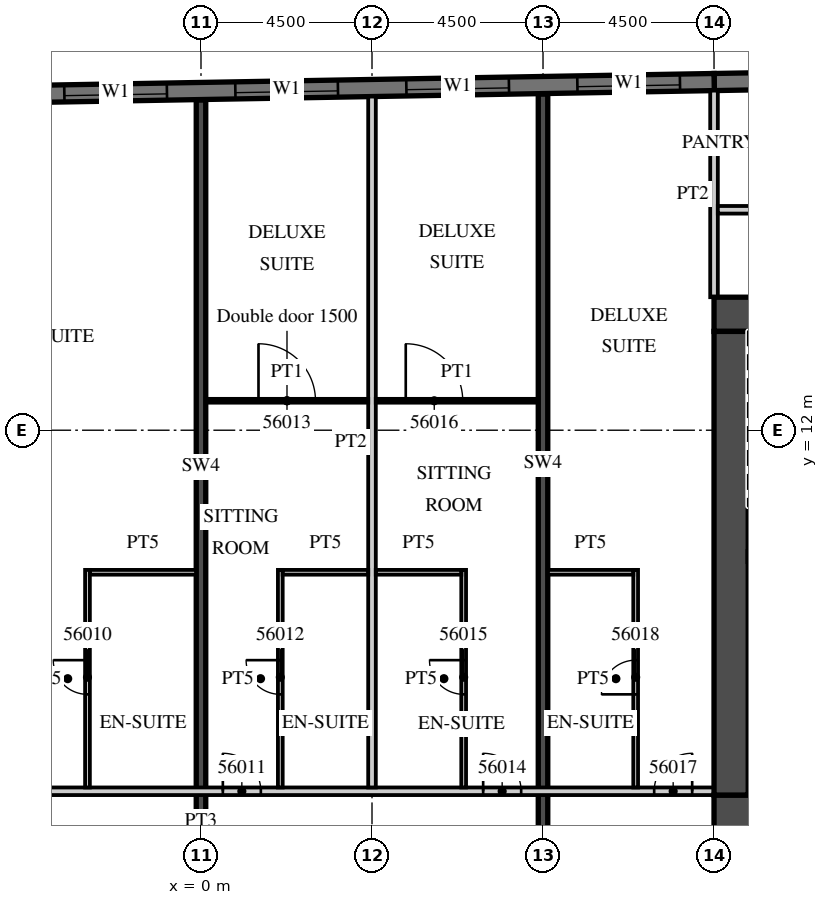
"""IFC4 building model, lengths in metres.
Left out: names, types, materials, properties, quantities, classifications, styles, units other than length and angle.
Written with IfcOpenShell. Run it as: python <this file> out.ifc"""

import sys

from ifc_helpers import new_model, si_unit, direction, frame, frame_2d, origin, place, context, subcontext, project, spatial, rectangle, extrude, element, fill, save


model = new_model("IFC4")
c1 = context("Model", 3, precision=1e-05, world=origin(), true_north=direction((0.0, 1.0)))
c2 = subcontext(c1, "Body", "Model", "MODEL_VIEW")
j1 = project(units=[si_unit("LENGTHUNIT", "METRE"), si_unit("PLANEANGLEUNIT", "RADIAN")], contexts=[c1])
p1 = place(None, origin())
s1 = spatial("IfcSite", under=j1, at=p1, CompositionType="ELEMENT")
p2 = place(p1, origin())
s2 = spatial("IfcBuilding", under=s1, at=p2, CompositionType="ELEMENT")
p3 = place(p2, frame((0.0, 0.0, 230.9)))
s3 = spatial("IfcBuildingStorey", under=s2, at=p3, CompositionType="ELEMENT", Elevation=230.9)
p4 = place(p3, frame((0.0, 1.4, 0.0), z_axis=(0.0, 0.0, 1.0), x_axis=(0.0, 1.0, 0.0)))
e1 = element("IfcWall", 1, at=p4, inside=s3, PredefinedType="SHEAR", context=c2, shape_type="SweptSolid", body=[
    extrude(rectangle(XDim=19.289, YDim=0.25, at=frame_2d((9.644, 0.0))), origin(), (0.0, 0.0, 1.0), 3.3),
])
p5 = place(p3, frame((9.0, 1.4, 0.0), z_axis=(0.0, 0.0, 1.0), x_axis=(0.0, 1.0, 0.0)))
e2 = element("IfcWall", 2, at=p5, inside=s3, PredefinedType="SHEAR", context=c2, shape_type="SweptSolid", body=[
    extrude(rectangle(XDim=19.446, YDim=0.25, at=frame_2d((9.723, 0.0))), origin(), (0.0, 0.0, 1.0), 3.3),
])
p6 = place(p3, frame((31.504, 21.476, 0.0), z_axis=(0.0, 0.0, 1.0), x_axis=(-0.999847677887, -0.017453395744, 0.0)))
e3 = element("IfcWall", 3, at=p6, inside=s3, PredefinedType="SOLIDWALL", context=c2, shape_type="SweptSolid", body=[
    extrude(rectangle(XDim=18.003, YDim=0.45, at=frame_2d((9.001, 0.0))), origin(), (0.0, 0.0, 1.0), 3.02),
])
p7 = place(p3, frame((13.504, 21.161, 0.0), z_axis=(0.0, 0.0, 1.0), x_axis=(-0.999847763257, -0.017448504532, 0.0)))
e4 = element("IfcWall", 4, at=p7, inside=s3, PredefinedType="SOLIDWALL", context=c2, shape_type="SweptSolid", body=[
    extrude(rectangle(XDim=46.859, YDim=0.45, at=frame_2d((23.43, 0.0))), origin(), (0.0, 0.0, 1.0), 3.02),
])
p8 = place(p7, frame((0.9, 0.0, 0.45)))
e5 = element("IfcOpeningElement", 5, at=p8, cuts=e4, PredefinedType="OPENING", context=c2, shape_type="SweptSolid", body=[
    extrude(rectangle(XDim=2.7, YDim=2.25, at=frame_2d((1.35, 1.125))), frame((0.0, 0.235, 0.0), z_axis=(0.0, -1.0, 0.0), x_axis=(1.0, 0.0, 0.0)), (0.0, 0.0, 1.0), 0.47),
])
p9 = place(p7, frame((5.401, 0.0, 0.45)))
e6 = element("IfcOpeningElement", 6, at=p9, cuts=e4, PredefinedType="OPENING", context=c2, shape_type="SweptSolid", body=[
    extrude(rectangle(XDim=2.7, YDim=2.25, at=frame_2d((1.35, 1.125))), frame((0.0, 0.235, 0.0), z_axis=(0.0, -1.0, 0.0), x_axis=(1.0, 0.0, 0.0)), (0.0, 0.0, 1.0), 0.47),
])
p10 = place(p7, frame((9.902, 0.0, 0.45)))
e7 = element("IfcOpeningElement", 7, at=p10, cuts=e4, PredefinedType="OPENING", context=c2, shape_type="SweptSolid", body=[
    extrude(rectangle(XDim=2.7, YDim=2.25, at=frame_2d((1.35, 1.125))), frame((0.0, 0.235, 0.0), z_axis=(0.0, -1.0, 0.0), x_axis=(1.0, 0.0, 0.0)), (0.0, 0.0, 1.0), 0.47),
])
p11 = place(p7, frame((14.402, 0.0, 0.45)))
e8 = element("IfcOpeningElement", 8, at=p11, cuts=e4, PredefinedType="OPENING", context=c2, shape_type="SweptSolid", body=[
    extrude(rectangle(XDim=2.7, YDim=2.25, at=frame_2d((1.35, 1.125))), frame((0.0, 0.235, 0.0), z_axis=(0.0, -1.0, 0.0), x_axis=(1.0, 0.0, 0.0)), (0.0, 0.0, 1.0), 0.47),
])
p12 = place(p7, frame((18.903, 0.0, 0.45)))
e9 = element("IfcOpeningElement", 9, at=p12, cuts=e4, PredefinedType="OPENING", context=c2, shape_type="SweptSolid", body=[
    extrude(rectangle(XDim=2.7, YDim=2.25, at=frame_2d((1.35, 1.125))), frame((0.0, 0.235, 0.0), z_axis=(0.0, -1.0, 0.0), x_axis=(1.0, 0.0, 0.0)), (0.0, 0.0, 1.0), 0.47),
])
p13 = place(p7, frame((23.404, 0.0, 0.45)))
e10 = element("IfcOpeningElement", 10, at=p13, cuts=e4, PredefinedType="OPENING", context=c2, shape_type="SweptSolid", body=[
    extrude(rectangle(XDim=2.7, YDim=2.25, at=frame_2d((1.35, 1.125))), frame((0.0, 0.235, 0.0), z_axis=(0.0, -1.0, 0.0), x_axis=(1.0, 0.0, 0.0)), (0.0, 0.0, 1.0), 0.47),
])
p14 = place(p7, frame((27.904, 0.0, 0.45)))
e11 = element("IfcOpeningElement", 11, at=p14, cuts=e4, PredefinedType="OPENING", context=c2, shape_type="SweptSolid", body=[
    extrude(rectangle(XDim=2.7, YDim=2.25, at=frame_2d((1.35, 1.125))), frame((0.0, 0.235, 0.0), z_axis=(0.0, -1.0, 0.0), x_axis=(1.0, 0.0, 0.0)), (0.0, 0.0, 1.0), 0.47),
])
p15 = place(p7, frame((32.405, 0.0, 0.45)))
e12 = element("IfcOpeningElement", 12, at=p15, cuts=e4, PredefinedType="OPENING", context=c2, shape_type="SweptSolid", body=[
    extrude(rectangle(XDim=2.7, YDim=2.25, at=frame_2d((1.35, 1.125))), frame((0.0, 0.235, 0.0), z_axis=(0.0, -1.0, 0.0), x_axis=(1.0, 0.0, 0.0)), (0.0, 0.0, 1.0), 0.47),
])
p16 = place(p7, frame((36.906, 0.0, 0.45)))
e13 = element("IfcOpeningElement", 13, at=p16, cuts=e4, PredefinedType="OPENING", context=c2, shape_type="SweptSolid", body=[
    extrude(rectangle(XDim=2.7, YDim=2.25, at=frame_2d((1.35, 1.125))), frame((0.0, 0.235, 0.0), z_axis=(0.0, -1.0, 0.0), x_axis=(1.0, 0.0, 0.0)), (0.0, 0.0, 1.0), 0.47),
])
p17 = place(p7, frame((41.406, 0.0, 0.45)))
e14 = element("IfcOpeningElement", 14, at=p17, cuts=e4, PredefinedType="OPENING", context=c2, shape_type="SweptSolid", body=[
    extrude(rectangle(XDim=2.7, YDim=2.25, at=frame_2d((1.35, 1.125))), frame((0.0, 0.235, 0.0), z_axis=(0.0, -1.0, 0.0), x_axis=(1.0, 0.0, 0.0)), (0.0, 0.0, 1.0), 0.47),
])
p18 = place(p3, frame((13.5, 15.5, 0.0), z_axis=(0.0, 0.0, 1.0), x_axis=(0.0, 1.0, 0.0)))
e15 = element("IfcWall", 15, at=p18, inside=s3, PredefinedType="PARTITIONING", context=c2, shape_type="SweptSolid", body=[
    extrude(rectangle(XDim=5.436, YDim=0.2, at=frame_2d((2.718, 0.0))), origin(), (0.0, 0.0, 1.0), 3.02),
])
p19 = place(p3, frame((-13.5, 2.5, 0.0), z_axis=(0.0, 0.0, 1.0), x_axis=(1.0, 0.0, 0.0)))
e16 = element("IfcWall", 16, at=p19, inside=s3, PredefinedType="PARTITIONING", context=c2, shape_type="SweptSolid", body=[
    extrude(rectangle(XDim=27.0, YDim=0.2, at=frame_2d((13.5, 0.0))), origin(), (0.0, 0.0, 1.0), 3.02),
])
p20 = place(p19, frame((2.925, 0.0, 0.0)))
e17 = element("IfcOpeningElement", 17, at=p20, cuts=e16, PredefinedType="OPENING", context=c2, shape_type="SweptSolid", body=[
    extrude(rectangle(XDim=1.0, YDim=2.1, at=frame_2d((0.5, 1.05))), frame((0.0, 0.11, 0.0), z_axis=(0.0, -1.0, 0.0), x_axis=(1.0, 0.0, 0.0)), (0.0, 0.0, 1.0), 0.22),
])
p21 = place(p19, frame((6.938, 0.0, 0.0)))
e18 = element("IfcOpeningElement", 18, at=p21, cuts=e16, PredefinedType="OPENING", context=c2, shape_type="SweptSolid", body=[
    extrude(rectangle(XDim=1.2, YDim=2.1, at=frame_2d((0.6, 1.05))), frame((0.0, 0.11, 0.0), z_axis=(0.0, -1.0, 0.0), x_axis=(1.0, 0.0, 0.0)), (0.0, 0.0, 1.0), 0.22),
])
p22 = place(p19, frame((14.075, 0.0, 0.0)))
e19 = element("IfcOpeningElement", 19, at=p22, cuts=e16, PredefinedType="OPENING", context=c2, shape_type="SweptSolid", body=[
    extrude(rectangle(XDim=1.0, YDim=2.1, at=frame_2d((0.5, 1.05))), frame((0.0, 0.11, 0.0), z_axis=(0.0, -1.0, 0.0), x_axis=(1.0, 0.0, 0.0)), (0.0, 0.0, 1.0), 0.22),
])
p23 = place(p19, frame((20.925, 0.0, 0.0)))
e20 = element("IfcOpeningElement", 20, at=p23, cuts=e16, PredefinedType="OPENING", context=c2, shape_type="SweptSolid", body=[
    extrude(rectangle(XDim=1.0, YDim=2.1, at=frame_2d((0.5, 1.05))), frame((0.0, 0.11, 0.0), z_axis=(0.0, -1.0, 0.0), x_axis=(1.0, 0.0, 0.0)), (0.0, 0.0, 1.0), 0.22),
])
p24 = place(p19, frame((25.425, 0.0, 0.0)))
e21 = element("IfcOpeningElement", 21, at=p24, cuts=e16, PredefinedType="OPENING", context=c2, shape_type="SweptSolid", body=[
    extrude(rectangle(XDim=1.0, YDim=2.1, at=frame_2d((0.5, 1.05))), frame((0.0, 0.11, 0.0), z_axis=(0.0, -1.0, 0.0), x_axis=(1.0, 0.0, 0.0)), (0.0, 0.0, 1.0), 0.22),
])
p25 = place(p3, frame((-2.987, 2.6, 0.0), z_axis=(0.0, 0.0, 1.0), x_axis=(0.0, 1.0, 0.0)))
e22 = element("IfcWall", 22, at=p25, inside=s3, PredefinedType="PARTITIONING", context=c2, shape_type="SweptSolid", body=[
    extrude(rectangle(XDim=5.725, YDim=0.125, at=frame_2d((2.862, 0.0))), origin(), (0.0, 0.0, 1.0), 3.02),
])
p26 = place(p25, frame((2.45, 0.0, 0.0)))
e23 = element("IfcOpeningElement", 23, at=p26, cuts=e22, PredefinedType="OPENING", context=c2, shape_type="SweptSolid", body=[
    extrude(rectangle(XDim=0.9, YDim=2.1, at=frame_2d((0.45, 1.05))), frame((0.0, 0.073, 0.0), z_axis=(0.0, -1.0, 0.0), x_axis=(1.0, 0.0, 0.0)), (0.0, 0.0, 1.0), 0.145),
])
p27 = place(p3, frame((-2.925, 8.262, 0.0), z_axis=(0.0, 0.0, 1.0), x_axis=(1.0, 0.0, 0.0)))
e24 = element("IfcWall", 24, at=p27, inside=s3, PredefinedType="PARTITIONING", context=c2, shape_type="SweptSolid", body=[
    extrude(rectangle(XDim=2.8, YDim=0.125, at=frame_2d((1.4, 0.0))), origin(), (0.0, 0.0, 1.0), 3.02),
])
p28 = place(p3, frame((4.5, 2.6, 0.0), z_axis=(0.0, 0.0, 1.0), x_axis=(0.0, 1.0, 0.0)))
e25 = element("IfcWall", 25, at=p28, inside=s3, PredefinedType="PARTITIONING", context=c2, shape_type="SweptSolid", body=[
    extrude(rectangle(XDim=18.179, YDim=0.2, at=frame_2d((9.089, 0.0))), origin(), (0.0, 0.0, 1.0), 3.02),
])
p29 = place(p3, frame((2.087, 2.6, 0.0), z_axis=(0.0, 0.0, 1.0), x_axis=(0.0, 1.0, 0.0)))
e26 = element("IfcWall", 26, at=p29, inside=s3, PredefinedType="PARTITIONING", context=c2, shape_type="SweptSolid", body=[
    extrude(rectangle(XDim=5.725, YDim=0.125, at=frame_2d((2.862, 0.0))), origin(), (0.0, 0.0, 1.0), 3.02),
])
p30 = place(p29, frame((2.45, 0.0, 0.0)))
e27 = element("IfcOpeningElement", 27, at=p30, cuts=e26, PredefinedType="OPENING", context=c2, shape_type="SweptSolid", body=[
    extrude(rectangle(XDim=0.9, YDim=2.1, at=frame_2d((0.45, 1.05))), frame((0.0, 0.073, 0.0), z_axis=(0.0, -1.0, 0.0), x_axis=(1.0, 0.0, 0.0)), (0.0, 0.0, 1.0), 0.145),
])
p31 = place(p3, frame((2.15, 8.262, 0.0), z_axis=(0.0, 0.0, 1.0), x_axis=(1.0, 0.0, 0.0)))
e28 = element("IfcWall", 28, at=p31, inside=s3, PredefinedType="PARTITIONING", context=c2, shape_type="SweptSolid", body=[
    extrude(rectangle(XDim=2.25, YDim=0.125, at=frame_2d((1.125, 0.0))), origin(), (0.0, 0.0, 1.0), 3.02),
])
p32 = place(p3, frame((0.125, 12.775, 0.0), z_axis=(0.0, 0.0, 1.0), x_axis=(1.0, 0.0, 0.0)))
e29 = element("IfcWall", 29, at=p32, inside=s3, PredefinedType="PARTITIONING", context=c2, shape_type="SweptSolid", body=[
    extrude(rectangle(XDim=4.275, YDim=0.1, at=frame_2d((2.137, 0.0))), origin(), (0.0, 0.0, 1.0), 3.02),
])
p33 = place(p32, frame((1.388, 0.0, 0.0)))
e30 = element("IfcOpeningElement", 30, at=p33, cuts=e29, PredefinedType="OPENING", context=c2, shape_type="SweptSolid", body=[
    extrude(rectangle(XDim=1.5, YDim=2.1, at=frame_2d((0.75, 1.05))), frame((0.0, 0.06, 0.0), z_axis=(0.0, -1.0, 0.0), x_axis=(1.0, 0.0, 0.0)), (0.0, 0.0, 1.0), 0.12),
])
p34 = place(p3, frame((6.912, 2.6, 0.0), z_axis=(0.0, 0.0, 1.0), x_axis=(0.0, 1.0, 0.0)))
e31 = element("IfcWall", 31, at=p34, inside=s3, PredefinedType="PARTITIONING", context=c2, shape_type="SweptSolid", body=[
    extrude(rectangle(XDim=5.725, YDim=0.125, at=frame_2d((2.862, 0.0))), origin(), (0.0, 0.0, 1.0), 3.02),
])
p35 = place(p34, frame((2.45, 0.0, 0.0)))
e32 = element("IfcOpeningElement", 32, at=p35, cuts=e31, PredefinedType="OPENING", context=c2, shape_type="SweptSolid", body=[
    extrude(rectangle(XDim=0.9, YDim=2.1, at=frame_2d((0.45, 1.05))), frame((0.0, 0.073, 0.0), z_axis=(0.0, -1.0, 0.0), x_axis=(1.0, 0.0, 0.0)), (0.0, 0.0, 1.0), 0.145),
])
p36 = place(p3, frame((4.6, 8.262, 0.0), z_axis=(0.0, 0.0, 1.0), x_axis=(1.0, 0.0, 0.0)))
e33 = element("IfcWall", 33, at=p36, inside=s3, PredefinedType="PARTITIONING", context=c2, shape_type="SweptSolid", body=[
    extrude(rectangle(XDim=2.25, YDim=0.125, at=frame_2d((1.125, 0.0))), origin(), (0.0, 0.0, 1.0), 3.02),
])
p37 = place(p3, frame((4.6, 12.775, 0.0), z_axis=(0.0, 0.0, 1.0), x_axis=(1.0, 0.0, 0.0)))
e34 = element("IfcWall", 34, at=p37, inside=s3, PredefinedType="PARTITIONING", context=c2, shape_type="SweptSolid", body=[
    extrude(rectangle(XDim=4.275, YDim=0.1, at=frame_2d((2.137, 0.0))), origin(), (0.0, 0.0, 1.0), 3.02),
])
p38 = place(p37, frame((0.788, 0.0, 0.0)))
e35 = element("IfcOpeningElement", 35, at=p38, cuts=e34, PredefinedType="OPENING", context=c2, shape_type="SweptSolid", body=[
    extrude(rectangle(XDim=1.5, YDim=2.1, at=frame_2d((0.75, 1.05))), frame((0.0, 0.06, 0.0), z_axis=(0.0, -1.0, 0.0), x_axis=(1.0, 0.0, 0.0)), (0.0, 0.0, 1.0), 0.12),
])
p39 = place(p3, frame((11.438, 2.6, 0.0), z_axis=(0.0, 0.0, 1.0), x_axis=(0.0, 1.0, 0.0)))
e36 = element("IfcWall", 36, at=p39, inside=s3, PredefinedType="PARTITIONING", context=c2, shape_type="SweptSolid", body=[
    extrude(rectangle(XDim=5.725, YDim=0.125, at=frame_2d((2.862, 0.0))), origin(), (0.0, 0.0, 1.0), 3.02),
])
p40 = place(p39, frame((2.45, 0.0, 0.0)))
e37 = element("IfcOpeningElement", 37, at=p40, cuts=e36, PredefinedType="OPENING", context=c2, shape_type="SweptSolid", body=[
    extrude(rectangle(XDim=0.9, YDim=2.1, at=frame_2d((0.45, 1.05))), frame((0.0, 0.073, 0.0), z_axis=(0.0, -1.0, 0.0), x_axis=(1.0, 0.0, 0.0)), (0.0, 0.0, 1.0), 0.145),
])
p41 = place(p3, frame((9.125, 8.262, 0.0), z_axis=(0.0, 0.0, 1.0), x_axis=(1.0, 0.0, 0.0)))
e38 = element("IfcWall", 38, at=p41, inside=s3, PredefinedType="PARTITIONING", context=c2, shape_type="SweptSolid", body=[
    extrude(rectangle(XDim=2.25, YDim=0.125, at=frame_2d((1.125, 0.0))), origin(), (0.0, 0.0, 1.0), 3.02),
])
p42 = place(p3, frame((13.5, 1.95, 0.0), z_axis=(0.0, 0.0, 1.0), x_axis=(1.0, 0.0, 0.0)))
e39 = element("IfcWall", 39, at=p42, inside=s3, PredefinedType="SHEAR", context=c2, shape_type="SweptSolid", body=[
    extrude(rectangle(XDim=18.0, YDim=0.9, at=frame_2d((9.0, 0.0))), origin(), (0.0, 0.0, 1.0), 3.02),
])
p43 = place(p42, frame((1.475, 0.0, 0.0)))
e40 = element("IfcOpeningElement", 40, at=p43, cuts=e39, PredefinedType="OPENING", context=c2, shape_type="SweptSolid", body=[
    extrude(rectangle(XDim=1.8, YDim=2.1, at=frame_2d((0.9, 1.05))), frame((0.0, 0.46, 0.0), z_axis=(0.0, -1.0, 0.0), x_axis=(1.0, 0.0, 0.0)), (0.0, 0.0, 1.0), 0.92),
])
p44 = place(p3, frame((13.5, 15.05, 0.0), z_axis=(0.0, 0.0, 1.0), x_axis=(1.0, 0.0, 0.0)))
e41 = element("IfcWall", 41, at=p44, inside=s3, PredefinedType="SHEAR", context=c2, shape_type="SweptSolid", body=[
    extrude(rectangle(XDim=6.8, YDim=0.9, at=frame_2d((3.4, 0.0))), origin(), (0.0, 0.0, 1.0), 3.02),
])
p45 = place(p44, frame((4.725, 0.0, 0.0)))
e42 = element("IfcOpeningElement", 42, at=p45, cuts=e41, PredefinedType="OPENING", context=c2, shape_type="SweptSolid", body=[
    extrude(rectangle(XDim=1.2, YDim=2.1, at=frame_2d((0.6, 1.05))), frame((0.0, 0.46, 0.0), z_axis=(0.0, -1.0, 0.0), x_axis=(1.0, 0.0, 0.0)), (0.0, 0.0, 1.0), 0.92),
])
p46 = place(p3, frame((13.95, 2.4, 0.0), z_axis=(0.0, 0.0, 1.0), x_axis=(0.0, 1.0, 0.0)))
e43 = element("IfcWall", 43, at=p46, inside=s3, PredefinedType="SHEAR", context=c2, shape_type="SweptSolid", body=[
    extrude(rectangle(XDim=12.2, YDim=0.9, at=frame_2d((6.1, 0.0))), origin(), (0.0, 0.0, 1.0), 3.02),
])
p47 = place(p3, frame((13.6, 17.8, 0.0), z_axis=(0.0, 0.0, 1.0), x_axis=(1.0, 0.0, 0.0)))
e44 = element("IfcWall", 44, at=p47, inside=s3, PredefinedType="PARTITIONING", context=c2, shape_type="SweptSolid", body=[
    extrude(rectangle(XDim=28.657, YDim=0.2, at=frame_2d((14.329, 0.0))), origin(), (0.0, 0.0, 1.0), 3.02),
])
p48 = place(p47, frame((15.012, 0.0, 0.0)))
e45 = element("IfcOpeningElement", 45, at=p48, cuts=e44, PredefinedType="OPENING", context=c2, shape_type="SweptSolid", body=[
    extrude(rectangle(XDim=0.9, YDim=2.1, at=frame_2d((0.45, 1.05))), frame((0.0, 0.11, 0.0), z_axis=(0.0, -1.0, 0.0), x_axis=(1.0, 0.0, 0.0)), (0.0, 0.0, 1.0), 0.22),
])
p49 = place(p47, frame((6.712, 0.0, 0.0)))
e46 = element("IfcOpeningElement", 46, at=p49, cuts=e44, PredefinedType="OPENING", context=c2, shape_type="SweptSolid", body=[
    extrude(rectangle(XDim=0.9, YDim=2.1, at=frame_2d((0.45, 1.05))), frame((0.0, 0.11, 0.0), z_axis=(0.0, -1.0, 0.0), x_axis=(1.0, 0.0, 0.0)), (0.0, 0.0, 1.0), 0.22),
])
p50 = place(p8, origin())
e47 = element("IfcWindow", 47, at=p50, inside=s3, PartitioningType="SINGLE_PANEL", PredefinedType="WINDOW", context=c2, shape_type="SweptSolid", body=[
    extrude(rectangle(XDim=2.7, YDim=2.25, at=frame_2d((1.35, 1.125))), frame((0.0, 0.09, 0.0), z_axis=(0.0, -1.0, 0.0), x_axis=(1.0, 0.0, 0.0)), (0.0, 0.0, 1.0), 0.06),
])
fill(e5, e47)
p51 = place(p9, origin())
e48 = element("IfcWindow", 48, at=p51, inside=s3, PartitioningType="SINGLE_PANEL", PredefinedType="WINDOW", context=c2, shape_type="SweptSolid", body=[
    extrude(rectangle(XDim=2.7, YDim=2.25, at=frame_2d((1.35, 1.125))), frame((0.0, 0.09, 0.0), z_axis=(0.0, -1.0, 0.0), x_axis=(1.0, 0.0, 0.0)), (0.0, 0.0, 1.0), 0.06),
])
fill(e6, e48)
p52 = place(p10, origin())
e49 = element("IfcWindow", 49, at=p52, inside=s3, PartitioningType="SINGLE_PANEL", PredefinedType="WINDOW", context=c2, shape_type="SweptSolid", body=[
    extrude(rectangle(XDim=2.7, YDim=2.25, at=frame_2d((1.35, 1.125))), frame((0.0, 0.09, 0.0), z_axis=(0.0, -1.0, 0.0), x_axis=(1.0, 0.0, 0.0)), (0.0, 0.0, 1.0), 0.06),
])
fill(e7, e49)
p53 = place(p11, origin())
e50 = element("IfcWindow", 50, at=p53, inside=s3, PartitioningType="SINGLE_PANEL", PredefinedType="WINDOW", context=c2, shape_type="SweptSolid", body=[
    extrude(rectangle(XDim=2.7, YDim=2.25, at=frame_2d((1.35, 1.125))), frame((0.0, 0.09, 0.0), z_axis=(0.0, -1.0, 0.0), x_axis=(1.0, 0.0, 0.0)), (0.0, 0.0, 1.0), 0.06),
])
fill(e8, e50)
p54 = place(p26, origin())
e51 = element("IfcDoor", 51, at=p54, inside=s3, OperationType="SINGLE_SWING_RIGHT", PredefinedType="DOOR", context=c2, shape_type="SweptSolid", body=[
    extrude(rectangle(XDim=0.9, YDim=2.1, at=frame_2d((0.45, 1.05))), frame((0.0, 0.025, 0.0), z_axis=(0.0, -1.0, 0.0), x_axis=(1.0, 0.0, 0.0)), (0.0, 0.0, 1.0), 0.05),
])
fill(e23, e51)
p55 = place(p22, origin())
e52 = element("IfcDoor", 52, at=p55, inside=s3, OperationType="SINGLE_SWING_LEFT", PredefinedType="DOOR", context=c2, shape_type="SweptSolid", body=[
    extrude(rectangle(XDim=1.0, YDim=2.1, at=frame_2d((0.5, 1.05))), frame((0.0, 0.025, 0.0), z_axis=(0.0, -1.0, 0.0), x_axis=(1.0, 0.0, 0.0)), (0.0, 0.0, 1.0), 0.05),
])
fill(e19, e52)
p56 = place(p30, origin())
e53 = element("IfcDoor", 53, at=p56, inside=s3, OperationType="SINGLE_SWING_RIGHT", PredefinedType="DOOR", context=c2, shape_type="SweptSolid", body=[
    extrude(rectangle(XDim=0.9, YDim=2.1, at=frame_2d((0.45, 1.05))), frame((0.0, 0.025, 0.0), z_axis=(0.0, -1.0, 0.0), x_axis=(1.0, 0.0, 0.0)), (0.0, 0.0, 1.0), 0.05),
])
fill(e27, e53)
p57 = place(p33, origin())
e54 = element("IfcDoor", 54, at=p57, inside=s3, OperationType="SINGLE_SWING_LEFT", PredefinedType="DOOR", context=c2, shape_type="SweptSolid", body=[
    extrude(rectangle(XDim=1.5, YDim=2.1, at=frame_2d((0.75, 1.05))), frame((0.0, 0.025, 0.0), z_axis=(0.0, -1.0, 0.0), x_axis=(1.0, 0.0, 0.0)), (0.0, 0.0, 1.0), 0.05),
])
fill(e30, e54)
p58 = place(p23, origin())
e55 = element("IfcDoor", 55, at=p58, inside=s3, OperationType="SINGLE_SWING_LEFT", PredefinedType="DOOR", context=c2, shape_type="SweptSolid", body=[
    extrude(rectangle(XDim=1.0, YDim=2.1, at=frame_2d((0.5, 1.05))), frame((0.0, 0.025, 0.0), z_axis=(0.0, -1.0, 0.0), x_axis=(1.0, 0.0, 0.0)), (0.0, 0.0, 1.0), 0.05),
])
fill(e20, e55)
p59 = place(p35, origin())
e56 = element("IfcDoor", 56, at=p59, inside=s3, OperationType="SINGLE_SWING_RIGHT", PredefinedType="DOOR", context=c2, shape_type="SweptSolid", body=[
    extrude(rectangle(XDim=0.9, YDim=2.1, at=frame_2d((0.45, 1.05))), frame((0.0, 0.025, 0.0), z_axis=(0.0, -1.0, 0.0), x_axis=(1.0, 0.0, 0.0)), (0.0, 0.0, 1.0), 0.05),
])
fill(e32, e56)
p60 = place(p38, origin())
e57 = element("IfcDoor", 57, at=p60, inside=s3, OperationType="SINGLE_SWING_LEFT", PredefinedType="DOOR", context=c2, shape_type="SweptSolid", body=[
    extrude(rectangle(XDim=1.5, YDim=2.1, at=frame_2d((0.75, 1.05))), frame((0.0, 0.025, 0.0), z_axis=(0.0, -1.0, 0.0), x_axis=(1.0, 0.0, 0.0)), (0.0, 0.0, 1.0), 0.05),
])
fill(e35, e57)
p61 = place(p24, origin())
e58 = element("IfcDoor", 58, at=p61, inside=s3, OperationType="SINGLE_SWING_RIGHT", PredefinedType="DOOR", context=c2, shape_type="SweptSolid", body=[
    extrude(rectangle(XDim=1.0, YDim=2.1, at=frame_2d((0.5, 1.05))), frame((0.0, 0.025, 0.0), z_axis=(0.0, -1.0, 0.0), x_axis=(1.0, 0.0, 0.0)), (0.0, 0.0, 1.0), 0.05),
])
fill(e21, e58)
p62 = place(p40, origin())
e59 = element("IfcDoor", 59, at=p62, inside=s3, OperationType="SINGLE_SWING_LEFT", PredefinedType="DOOR", context=c2, shape_type="SweptSolid", body=[
    extrude(rectangle(XDim=0.9, YDim=2.1, at=frame_2d((0.45, 1.05))), frame((0.0, 0.025, 0.0), z_axis=(0.0, -1.0, 0.0), x_axis=(1.0, 0.0, 0.0)), (0.0, 0.0, 1.0), 0.05),
])
fill(e37, e59)
save(model, sys.argv[1])
